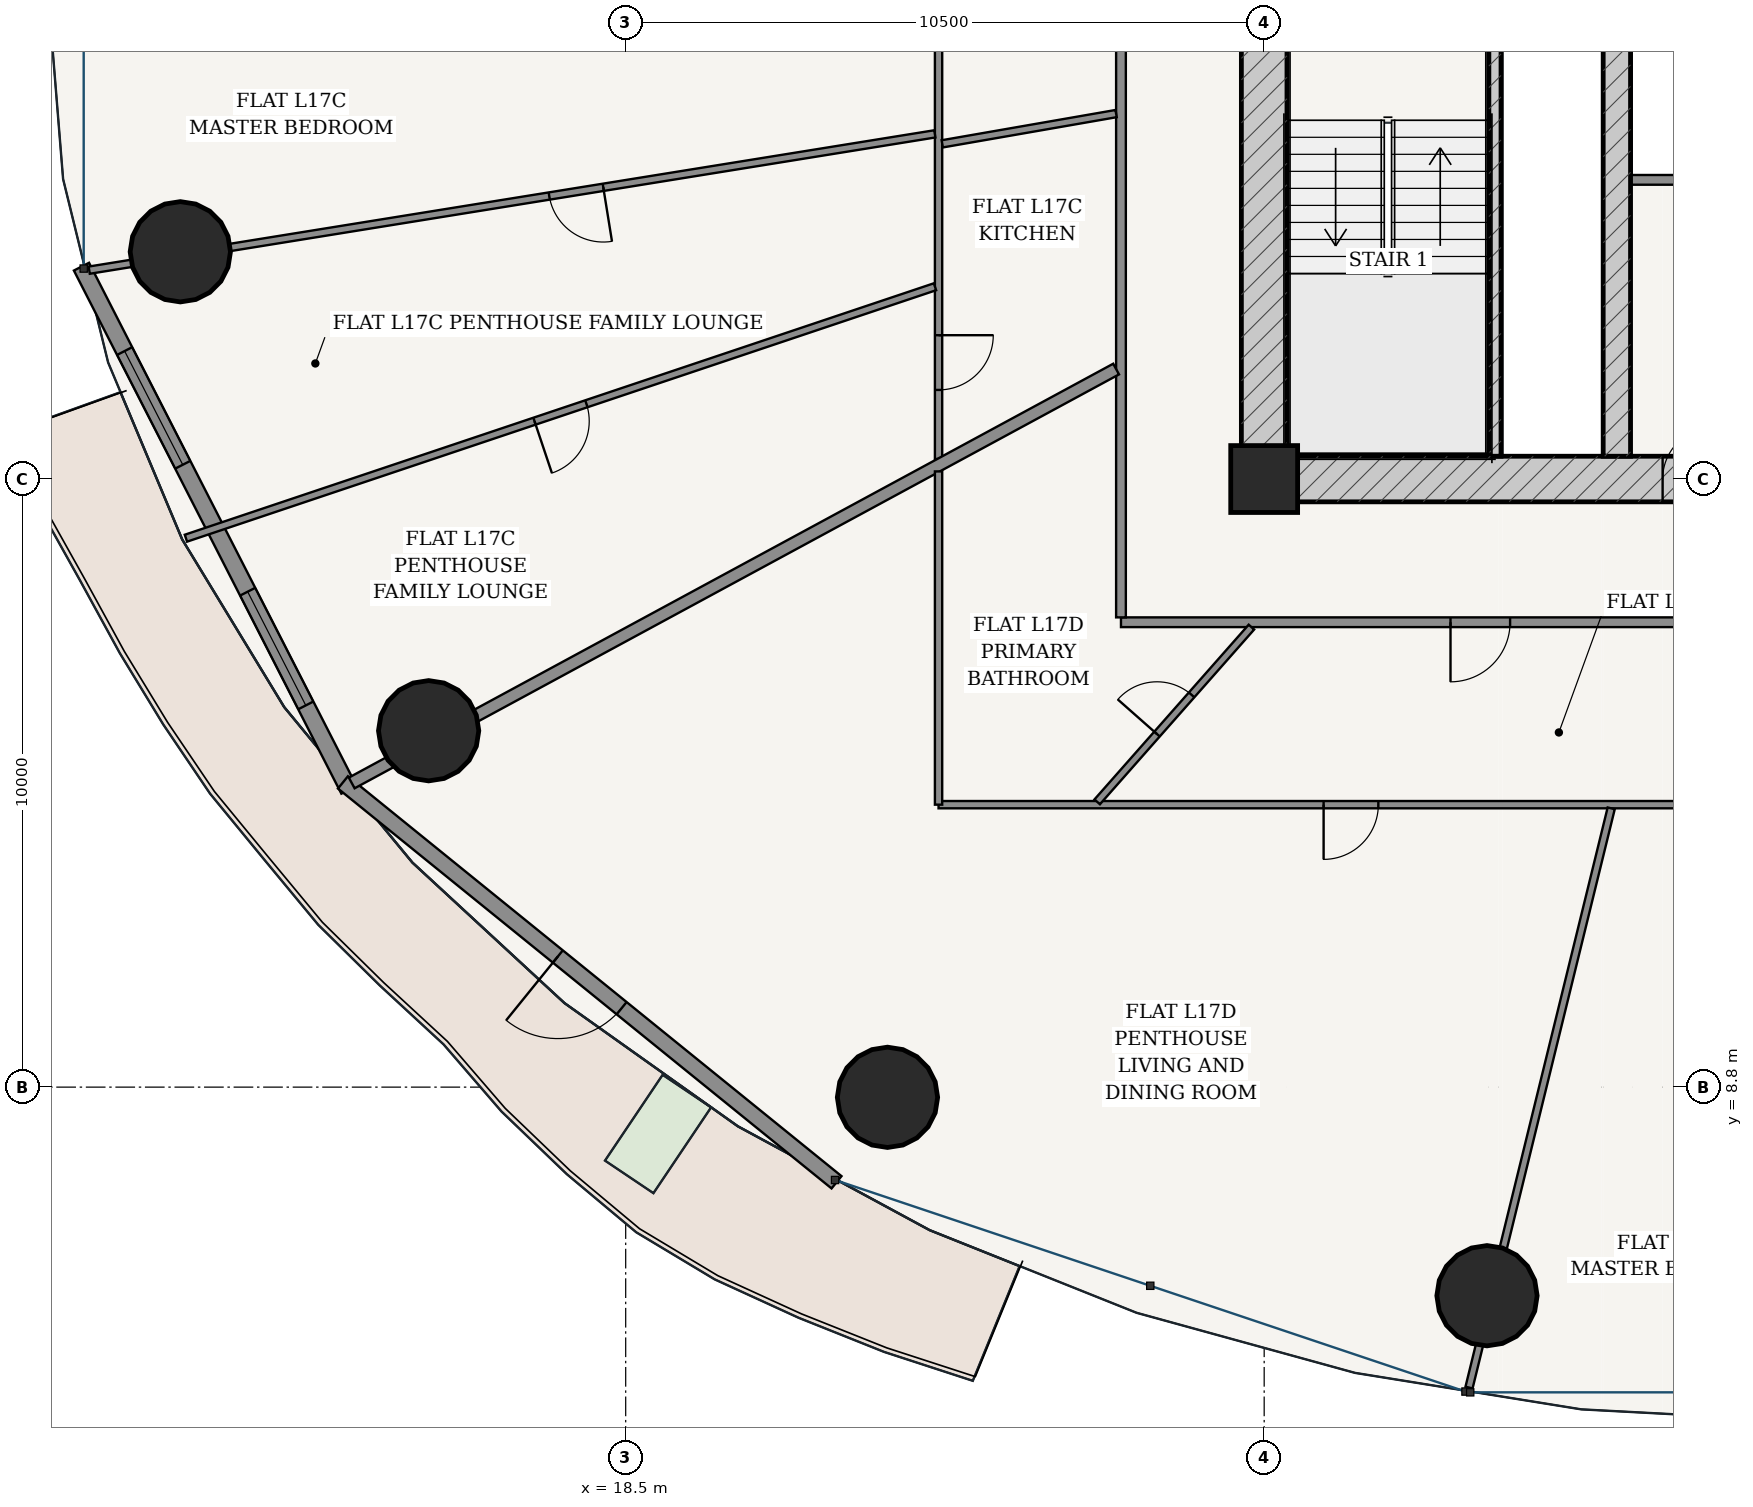
"""IFC4 building model, lengths in metres.
Left out: names, types, materials, properties, quantities, classifications, styles, units other than length and angle.
Written with IfcOpenShell. Run it as: python <this file> out.ifc"""

import sys

from ifc_helpers import new_model, si_unit, direction, frame, frame_2d, origin, origin_2d, place, context, subcontext, project, spatial, rectangle, hollow_circle, extrude, source, transform, mapped, element, fill, save


model = new_model("IFC4")
c1 = context("Model", 3, precision=1e-05, world=origin(), true_north=direction((-0.2419218956, 0.970295726276)))
c2 = subcontext(c1, "Body", "Model", "MODEL_VIEW")
j1 = project(units=[si_unit("LENGTHUNIT", "METRE"), si_unit("PLANEANGLEUNIT", "RADIAN")], contexts=[c1])
p1 = place(None, origin())
s1 = spatial("IfcSite", under=j1, at=p1, CompositionType="ELEMENT")
p2 = place(p1, origin())
s2 = spatial("IfcBuilding", under=s1, at=p2, CompositionType="ELEMENT")
p3 = place(p2, frame((0.0, 0.0, 67.2)))
s3 = spatial("IfcBuildingStorey", under=s2, at=p3, CompositionType="ELEMENT", Elevation=67.2)
p4 = place(p3, frame((29.0, 18.8, 0.0), z_axis=(0.0, 0.0, 1.0), x_axis=(1.0, 0.0, 0.0)))
e1 = element("IfcColumn", 1, at=p4, inside=s3, PredefinedType="COLUMN", context=c2, shape_type="SweptSolid", body=[
    extrude(rectangle(XDim=1.1, YDim=1.1, at=origin_2d()), origin(), (0.0, 0.0, 1.0), 3.6),
])
p5 = place(p3, frame((28.625, 18.8, 0.0), z_axis=(0.0, 0.0, 1.0), x_axis=(1.0, 0.0, 0.0)))
e2 = element("IfcWall", 2, at=p5, inside=s3, PredefinedType="SHEAR", context=c2, shape_type="SweptSolid", body=[
    extrude(rectangle(XDim=18.75, YDim=0.75, at=frame_2d((9.375, 0.0))), origin(), (0.0, 0.0, 1.0), 3.32),
])
p6 = place(p5, frame((6.927, 0.0, 0.0)))
e3 = element("IfcOpeningElement", 3, at=p6, cuts=e2, PredefinedType="OPENING", context=c2, shape_type="SweptSolid", body=[
    extrude(rectangle(XDim=0.85, YDim=2.1, at=frame_2d((0.425, 1.05))), frame((0.0, 0.385, 0.0), z_axis=(0.0, -1.0, 0.0), x_axis=(1.0, 0.0, 0.0)), (0.0, 0.0, 1.0), 0.77),
])
p7 = place(p5, frame((8.95, 0.0, 0.0)))
e4 = element("IfcOpeningElement", 4, at=p7, cuts=e2, PredefinedType="OPENING", context=c2, shape_type="SweptSolid", body=[
    extrude(rectangle(XDim=0.85, YDim=2.1, at=frame_2d((0.425, 1.05))), frame((0.0, 0.385, 0.0), z_axis=(0.0, -1.0, 0.0), x_axis=(1.0, 0.0, 0.0)), (0.0, 0.0, 1.0), 0.77),
])
p8 = place(p5, frame((10.972, 0.0, 0.0)))
e5 = element("IfcOpeningElement", 5, at=p8, cuts=e2, PredefinedType="OPENING", context=c2, shape_type="SweptSolid", body=[
    extrude(rectangle(XDim=0.85, YDim=2.1, at=frame_2d((0.425, 1.05))), frame((0.0, 0.385, 0.0), z_axis=(0.0, -1.0, 0.0), x_axis=(1.0, 0.0, 0.0)), (0.0, 0.0, 1.0), 0.77),
])
p9 = place(p3, frame((29.0, 19.175, 0.0), z_axis=(0.0, 0.0, 1.0), x_axis=(0.0, 1.0, 0.0)))
e6 = element("IfcWall", 6, at=p9, inside=s3, PredefinedType="SHEAR", context=c2, shape_type="SweptSolid", body=[
    extrude(rectangle(XDim=15.25, YDim=0.75, at=frame_2d((7.625, 0.0))), origin(), (0.0, 0.0, 1.0), 3.32),
])
p10 = place(p9, frame((9.875, 0.0, 0.0)))
e7 = element("IfcOpeningElement", 7, at=p10, cuts=e6, PredefinedType="OPENING", context=c2, shape_type="SweptSolid", body=[
    extrude(rectangle(XDim=1.5, YDim=2.2, at=frame_2d((0.75, 1.1))), frame((0.0, 0.385, 0.0), z_axis=(0.0, -1.0, 0.0), x_axis=(1.0, 0.0, 0.0)), (0.0, 0.0, 1.0), 0.77),
])
p11 = place(p3, frame((32.795, 19.175, 0.0), z_axis=(0.0, 0.0, 1.0), x_axis=(0.0, 1.0, 0.0)))
e8 = element("IfcWall", 8, at=p11, inside=s3, PredefinedType="SOLIDWALL", context=c2, shape_type="SweptSolid", body=[
    extrude(rectangle(XDim=7.375, YDim=0.2, at=frame_2d((3.688, 0.0))), origin(), (0.0, 0.0, 1.0), 3.32),
])
p12 = place(p3, frame((34.8, 19.175, 0.0), z_axis=(0.0, 0.0, 1.0), x_axis=(0.0, 1.0, 0.0)))
e9 = element("IfcWall", 9, at=p12, inside=s3, PredefinedType="SHEAR", context=c2, shape_type="SweptSolid", body=[
    extrude(rectangle(XDim=15.25, YDim=0.45, at=frame_2d((7.625, 0.0))), origin(), (0.0, 0.0, 1.0), 3.32),
])
p13 = place(p12, frame((7.8, 0.0, 0.0)))
e10 = element("IfcOpeningElement", 10, at=p13, cuts=e9, PredefinedType="OPENING", context=c2, shape_type="SweptSolid", body=[
    extrude(rectangle(XDim=1.05, YDim=2.15, at=frame_2d((0.525, 1.075))), frame((0.0, 0.235, 0.0), z_axis=(0.0, -1.0, 0.0), x_axis=(1.0, 0.0, 0.0)), (0.0, 0.0, 1.0), 0.47),
])
for number, where, z_axis, x_axis in (
    (11, (11.176, 22.537, 0.0), (0.0, 0.0, 1.0), (1.0, 0.0, 0.0)),
    (12, (15.259, 14.661, 0.0), (0.0, 0.0, 1.0), (1.0, 0.0, 0.0)),
    (13, (22.805, 8.632, 0.0), (0.0, 0.0, 1.0), (1.0, 0.0, 0.0)),
    (14, (32.664, 5.37, 0.0), (0.0, 0.0, 1.0), (1.0, 0.0, 0.0)),
):
    element("IfcColumn", number, at=place(p3, frame(where, z_axis=z_axis, x_axis=x_axis)), inside=s3, PredefinedType="COLUMN", context=c2, shape_type="SweptSolid", body=[
        extrude(hollow_circle(Radius=0.825, WallThickness=0.05, at=origin_2d()), origin(), (0.0, 0.0, 1.0), 3.6),
    ])
p14 = place(p3, frame((9.55, 22.292, 0.0), z_axis=(0.0, 0.0, 1.0), x_axis=(0.455220575541, -0.890378698984, 0.0)))
e15 = element("IfcWall", 15, at=p14, inside=s3, PredefinedType="SOLIDWALL", context=c2, shape_type="SweptSolid", body=[
    extrude(rectangle(XDim=9.662, YDim=0.28, at=frame_2d((4.831, 0.0))), origin(), (0.0, 0.0, 1.0), 3.32),
])
p15 = place(p14, frame((1.559, 0.0, 0.85)))
e16 = element("IfcOpeningElement", 16, at=p15, cuts=e15, PredefinedType="OPENING", context=c2, shape_type="SweptSolid", body=[
    extrude(rectangle(XDim=2.1, YDim=1.95, at=frame_2d((1.05, 0.975))), frame((0.0, 0.15, 0.0), z_axis=(0.0, -1.0, 0.0), x_axis=(1.0, 0.0, 0.0)), (0.0, 0.0, 1.0), 0.3),
])
p16 = place(p14, frame((6.003, 0.0, 0.85)))
e17 = element("IfcOpeningElement", 17, at=p16, cuts=e15, PredefinedType="OPENING", context=c2, shape_type="SweptSolid", body=[
    extrude(rectangle(XDim=2.1, YDim=1.95, at=frame_2d((1.05, 0.975))), frame((0.0, 0.15, 0.0), z_axis=(0.0, -1.0, 0.0), x_axis=(1.0, 0.0, 0.0)), (0.0, 0.0, 1.0), 0.3),
])
p17 = place(p3, frame((13.85, 13.811, 0.0), z_axis=(0.0, 0.0, 1.0), x_axis=(0.777016782851, -0.629479879875, 0.0)))
e18 = element("IfcWall", 18, at=p17, inside=s3, PredefinedType="SOLIDWALL", context=c2, shape_type="SweptSolid", body=[
    extrude(rectangle(XDim=10.447, YDim=0.26, at=frame_2d((5.223, 0.0))), origin(), (0.0, 0.0, 1.0), 3.32),
])
p18 = place(p17, frame((4.548, 0.0, 0.0)))
e19 = element("IfcOpeningElement", 19, at=p18, cuts=e18, PredefinedType="OPENING", context=c2, shape_type="SweptSolid", body=[
    extrude(rectangle(XDim=1.35, YDim=2.2, at=frame_2d((0.675, 1.1))), frame((0.0, 0.14, 0.0), z_axis=(0.0, -1.0, 0.0), x_axis=(1.0, 0.0, 0.0)), (0.0, 0.0, 1.0), 0.28),
])
p19 = place(p3, frame((35.025, 23.72, 0.0), z_axis=(0.0, 0.0, 1.0), x_axis=(1.0, 0.0, 0.0)))
e20 = element("IfcWall", 20, at=p19, inside=s3, PredefinedType="PARTITIONING", context=c2, shape_type="SweptSolid", body=[
    extrude(rectangle(XDim=5.95, YDim=0.16, at=frame_2d((2.975, 0.0))), origin(), (0.0, 0.0, 1.0), 3.32),
])
p20 = place(p3, frame((26.645, 16.445, 0.0), z_axis=(0.0, 0.0, 1.0), x_axis=(1.0, 0.0, 0.0)))
e21 = element("IfcWall", 21, at=p20, inside=s3, PredefinedType="PARTITIONING", context=c2, shape_type="SweptSolid", body=[
    extrude(rectangle(XDim=22.71, YDim=0.16, at=frame_2d((11.355, 0.0))), origin(), (0.0, 0.0, 1.0), 2.688),
])
p21 = place(p20, frame((5.419, 0.0, 0.0)))
e22 = element("IfcOpeningElement", 22, at=p21, cuts=e21, PredefinedType="OPENING", context=c2, shape_type="SweptSolid", body=[
    extrude(rectangle(XDim=0.98, YDim=2.2, at=frame_2d((0.49, 1.1))), frame((0.0, 0.09, 0.0), z_axis=(0.0, -1.0, 0.0), x_axis=(1.0, 0.0, 0.0)), (0.0, 0.0, 1.0), 0.18),
])
p22 = place(p3, frame((26.645, 16.525, 0.0), z_axis=(0.0, 0.0, 1.0), x_axis=(0.0, 1.0, 0.0)))
e23 = element("IfcWall", 23, at=p22, inside=s3, PredefinedType="PARTITIONING", context=c2, shape_type="SweptSolid", body=[
    extrude(rectangle(XDim=20.55, YDim=0.16, at=frame_2d((10.275, 0.0))), origin(), (0.0, 0.0, 1.0), 2.688),
])
p23 = place(p22, frame((16.199, 0.0, 0.0)))
e24 = element("IfcOpeningElement", 24, at=p23, cuts=e23, PredefinedType="OPENING", context=c2, shape_type="SweptSolid", body=[
    extrude(rectangle(XDim=0.98, YDim=2.2, at=frame_2d((0.49, 1.1))), frame((0.0, 0.09, 0.0), z_axis=(0.0, -1.0, 0.0), x_axis=(1.0, 0.0, 0.0)), (0.0, 0.0, 1.0), 0.18),
])
p24 = place(p3, frame((23.645, 19.129, 0.0), z_axis=(0.0, 0.0, 1.0), x_axis=(0.0, 1.0, 0.0)))
e25 = element("IfcWall", 25, at=p24, inside=s3, PredefinedType="PARTITIONING", context=c2, shape_type="SweptSolid", body=[
    extrude(rectangle(XDim=19.201, YDim=0.12, at=frame_2d((9.601, 0.0))), origin(), (0.0, 0.0, 1.0), 2.688),
])
p25 = place(p24, frame((15.038, 0.0, 0.0)))
e26 = element("IfcOpeningElement", 26, at=p25, cuts=e25, PredefinedType="OPENING", context=c2, shape_type="SweptSolid", body=[
    extrude(rectangle(XDim=0.9, YDim=2.15, at=frame_2d((0.45, 1.075))), frame((0.0, 0.07, 0.0), z_axis=(0.0, -1.0, 0.0), x_axis=(1.0, 0.0, 0.0)), (0.0, 0.0, 1.0), 0.14),
])
p26 = place(p24, frame((1.136, 0.0, 0.0)))
e27 = element("IfcOpeningElement", 27, at=p26, cuts=e25, PredefinedType="OPENING", context=c2, shape_type="SweptSolid", body=[
    extrude(rectangle(XDim=0.9, YDim=2.15, at=frame_2d((0.45, 1.075))), frame((0.0, 0.07, 0.0), z_axis=(0.0, -1.0, 0.0), x_axis=(1.0, 0.0, 0.0)), (0.0, 0.0, 1.0), 0.14),
])
p27 = place(p3, frame((23.584, 24.476, 0.0), z_axis=(0.0, 0.0, 1.0), x_axis=(-0.987257727093, -0.159129445092, 0.0)))
e28 = element("IfcWall", 28, at=p27, inside=s3, PredefinedType="PARTITIONING", context=c2, shape_type="SweptSolid", body=[
    extrude(rectangle(XDim=14.086, YDim=0.12, at=frame_2d((7.043, 0.0))), origin(), (0.0, 0.0, 1.0), 2.688),
])
p28 = place(p27, frame((5.523, 0.0, 0.0)))
e29 = element("IfcOpeningElement", 29, at=p28, cuts=e28, PredefinedType="OPENING", context=c2, shape_type="SweptSolid", body=[
    extrude(rectangle(XDim=0.9, YDim=2.15, at=frame_2d((0.45, 1.075))), frame((0.0, 0.07, 0.0), z_axis=(0.0, -1.0, 0.0), x_axis=(1.0, 0.0, 0.0)), (0.0, 0.0, 1.0), 0.14),
])
p29 = place(p3, frame((23.586, 21.962, 0.0), z_axis=(0.0, 0.0, 1.0), x_axis=(-0.948021751459, -0.318205529118, 0.0)))
e30 = element("IfcWall", 30, at=p29, inside=s3, PredefinedType="PARTITIONING", context=c2, shape_type="SweptSolid", body=[
    extrude(rectangle(XDim=12.994, YDim=0.12, at=frame_2d((6.497, 0.0))), origin(), (0.0, 0.0, 1.0), 2.762),
])
p30 = place(p29, frame((6.047, 0.0, 0.0)))
e31 = element("IfcOpeningElement", 31, at=p30, cuts=e30, PredefinedType="OPENING", context=c2, shape_type="SweptSolid", body=[
    extrude(rectangle(XDim=0.9, YDim=2.15, at=frame_2d((0.45, 1.075))), frame((0.0, 0.07, 0.0), z_axis=(0.0, -1.0, 0.0), x_axis=(1.0, 0.0, 0.0)), (0.0, 0.0, 1.0), 0.14),
])
p31 = place(p3, frame((26.565, 24.81, 0.0), z_axis=(0.0, 0.0, 1.0), x_axis=(-0.985190752909, -0.171461891924, 0.0)))
e32 = element("IfcWall", 32, at=p31, inside=s3, PredefinedType="PARTITIONING", context=c2, shape_type="SweptSolid", body=[
    extrude(rectangle(XDim=2.902, YDim=0.12, at=frame_2d((1.451, 0.0))), origin(), (0.0, 0.0, 1.0), 2.688),
])
p32 = place(p3, frame((26.565, 20.608, 0.0), z_axis=(0.0, 0.0, 1.0), x_axis=(-0.879369737803, -0.476139542819, 0.0)))
e33 = element("IfcWall", 33, at=p32, inside=s3, PredefinedType="PARTITIONING", context=c2, shape_type="SweptSolid", body=[
    extrude(rectangle(XDim=14.295, YDim=0.2, at=frame_2d((7.147, 0.0))), origin(), (0.0, 0.0, 1.0), 2.688),
])
p33 = place(p3, frame((41.176, 13.445, 0.0), z_axis=(0.0, 0.0, 1.0), x_axis=(-1.0, 0.0, 0.0)))
e34 = element("IfcWall", 34, at=p33, inside=s3, PredefinedType="PARTITIONING", context=c2, shape_type="SweptSolid", body=[
    extrude(rectangle(XDim=17.531, YDim=0.12, at=frame_2d((8.766, 0.0))), origin(), (0.0, 0.0, 1.0), 2.688),
])
p34 = place(p33, frame((10.299, 0.0, 0.0)))
e35 = element("IfcOpeningElement", 35, at=p34, cuts=e34, PredefinedType="OPENING", context=c2, shape_type="SweptSolid", body=[
    extrude(rectangle(XDim=0.9, YDim=2.15, at=frame_2d((0.45, 1.075))), frame((0.0, 0.07, 0.0), z_axis=(0.0, -1.0, 0.0), x_axis=(1.0, 0.0, 0.0)), (0.0, 0.0, 1.0), 0.14),
])
p35 = place(p33, frame((1.258, 0.0, 0.0)))
e36 = element("IfcOpeningElement", 36, at=p35, cuts=e34, PredefinedType="OPENING", context=c2, shape_type="SweptSolid", body=[
    extrude(rectangle(XDim=0.9, YDim=2.15, at=frame_2d((0.45, 1.075))), frame((0.0, 0.07, 0.0), z_axis=(0.0, -1.0, 0.0), x_axis=(1.0, 0.0, 0.0)), (0.0, 0.0, 1.0), 0.14),
])
p36 = place(p3, frame((23.645, 13.445, 0.0), z_axis=(0.0, 0.0, 1.0), x_axis=(0.0, 1.0, 0.0)))
e37 = element("IfcWall", 37, at=p36, inside=s3, PredefinedType="PARTITIONING", context=c2, shape_type="SweptSolid", body=[
    extrude(rectangle(XDim=5.48, YDim=0.12, at=frame_2d((2.74, 0.0))), origin(), (0.0, 0.0, 1.0), 2.999),
])
p37 = place(p3, frame((34.707, 13.385, 0.0), z_axis=(0.0, 0.0, 1.0), x_axis=(-0.238386763388, -0.971170299711, 0.0)))
e38 = element("IfcWall", 38, at=p37, inside=s3, PredefinedType="PARTITIONING", context=c2, shape_type="SweptSolid", body=[
    extrude(rectangle(XDim=9.808, YDim=0.12, at=frame_2d((4.904, 0.0))), origin(), (0.0, 0.0, 1.0), 2.688),
])
p38 = place(p3, frame((28.79, 16.365, 0.0), z_axis=(0.0, 0.0, 1.0), x_axis=(-0.661718545222, -0.749752337048, 0.0)))
e39 = element("IfcWall", 39, at=p38, inside=s3, PredefinedType="PARTITIONING", context=c2, shape_type="SweptSolid", body=[
    extrude(rectangle(XDim=3.833, YDim=0.12, at=frame_2d((1.917, 0.0))), origin(), (0.0, 0.0, 1.0), 2.999),
])
p39 = place(p38, frame((1.486, 0.0, 0.0)))
e40 = element("IfcOpeningElement", 40, at=p39, cuts=e39, PredefinedType="OPENING", context=c2, shape_type="SweptSolid", body=[
    extrude(rectangle(XDim=0.86, YDim=2.15, at=frame_2d((0.43, 1.075))), frame((0.0, 0.07, 0.0), z_axis=(0.0, -1.0, 0.0), x_axis=(1.0, 0.0, 0.0)), (0.0, 0.0, 1.0), 0.14),
])
m1 = source(origin(), c2, "Body", "SweptSolid", [
    extrude(rectangle(XDim=2.1, YDim=1.95, at=frame_2d((1.05, 0.975))), frame((0.0, 0.03, 0.0), z_axis=(0.0, -1.0, 0.0), x_axis=(1.0, 0.0, 0.0)), (0.0, 0.0, 1.0), 0.06),
])
p40 = place(p15, origin())
e41 = element("IfcWindow", 41, at=p40, inside=s3, PartitioningType="SINGLE_PANEL", PredefinedType="WINDOW", context=c2, shape_type="MappedRepresentation", body=[
    mapped(m1, transform((0.0, 0.0, 0.0), scale=1.0)),
])
fill(e16, e41)
p41 = place(p16, origin())
e42 = element("IfcWindow", 42, at=p41, inside=s3, PartitioningType="SINGLE_PANEL", PredefinedType="WINDOW", context=c2, shape_type="MappedRepresentation", body=[
    mapped(m1, transform((0.0, 0.0, 0.0), scale=1.0)),
])
fill(e17, e42)
m2 = source(origin(), c2, "Body", "SweptSolid", [
    extrude(rectangle(XDim=1.35, YDim=2.2, at=frame_2d((0.675, 1.1))), frame((0.0, 0.025, 0.0), z_axis=(0.0, -1.0, 0.0), x_axis=(1.0, 0.0, 0.0)), (0.0, 0.0, 1.0), 0.05),
])
p42 = place(p18, frame((1.35, 0.0, 0.0), z_axis=(0.0, 0.0, 1.0), x_axis=(-1.0, 0.0, 0.0)))
e43 = element("IfcDoor", 43, at=p42, inside=s3, OperationType="SINGLE_SWING_RIGHT", PredefinedType="DOOR", context=c2, shape_type="MappedRepresentation", body=[
    mapped(m2, transform((0.0, 0.0, 0.0), scale=1.0)),
])
fill(e19, e43)
m3 = source(origin(), c2, "Body", "SweptSolid", [
    extrude(rectangle(XDim=0.85, YDim=2.1, at=frame_2d((0.425, 1.05))), frame((0.0, 0.025, 0.0), z_axis=(0.0, -1.0, 0.0), x_axis=(1.0, 0.0, 0.0)), (0.0, 0.0, 1.0), 0.05),
])
p43 = place(p6, origin())
e44 = element("IfcDoor", 44, at=p43, inside=s3, OperationType="SINGLE_SWING_RIGHT", PredefinedType="DOOR", context=c2, shape_type="MappedRepresentation", body=[
    mapped(m3, transform((0.0, 0.0, 0.0), scale=1.0)),
])
fill(e3, e44)
m4 = source(origin(), c2, "Body", "SweptSolid", [
    extrude(rectangle(XDim=0.9, YDim=2.15, at=frame_2d((0.45, 1.075))), frame((0.0, 0.025, 0.0), z_axis=(0.0, -1.0, 0.0), x_axis=(1.0, 0.0, 0.0)), (0.0, 0.0, 1.0), 0.05),
])
p44 = place(p28, origin())
e45 = element("IfcDoor", 45, at=p44, inside=s3, OperationType="SINGLE_SWING_LEFT", PredefinedType="DOOR", context=c2, shape_type="MappedRepresentation", body=[
    mapped(m4, transform((0.0, 0.0, 0.0), scale=1.0)),
])
fill(e29, e45)
p45 = place(p30, origin())
e46 = element("IfcDoor", 46, at=p45, inside=s3, OperationType="SINGLE_SWING_RIGHT", PredefinedType="DOOR", context=c2, shape_type="MappedRepresentation", body=[
    mapped(m4, transform((0.0, 0.0, 0.0), scale=1.0)),
])
fill(e31, e46)
p46 = place(p26, frame((0.9, 0.0, 0.0), z_axis=(0.0, 0.0, 1.0), x_axis=(-1.0, 0.0, 0.0)))
e47 = element("IfcDoor", 47, at=p46, inside=s3, OperationType="SINGLE_SWING_LEFT", PredefinedType="DOOR", context=c2, shape_type="MappedRepresentation", body=[
    mapped(m4, transform((0.0, 0.0, 0.0), scale=1.0)),
])
fill(e27, e47)
m5 = source(origin(), c2, "Body", "SweptSolid", [
    extrude(rectangle(XDim=0.98, YDim=2.2, at=frame_2d((0.49, 1.1))), frame((0.0, 0.025, 0.0), z_axis=(0.0, -1.0, 0.0), x_axis=(1.0, 0.0, 0.0)), (0.0, 0.0, 1.0), 0.05),
])
p47 = place(p21, frame((0.98, 0.0, 0.0), z_axis=(0.0, 0.0, 1.0), x_axis=(-1.0, 0.0, 0.0)))
e48 = element("IfcDoor", 48, at=p47, inside=s3, OperationType="SINGLE_SWING_RIGHT", PredefinedType="DOOR", context=c2, shape_type="MappedRepresentation", body=[
    mapped(m5, transform((0.0, 0.0, 0.0), scale=1.0)),
])
fill(e22, e48)
m6 = source(origin(), c2, "Body", "SweptSolid", [
    extrude(rectangle(XDim=0.86, YDim=2.15, at=frame_2d((0.43, 1.075))), frame((0.0, 0.025, 0.0), z_axis=(0.0, -1.0, 0.0), x_axis=(1.0, 0.0, 0.0)), (0.0, 0.0, 1.0), 0.05),
])
p48 = place(p39, frame((0.86, 0.0, 0.0), z_axis=(0.0, 0.0, 1.0), x_axis=(-1.0, 0.0, 0.0)))
e49 = element("IfcDoor", 49, at=p48, inside=s3, OperationType="SINGLE_SWING_LEFT", PredefinedType="DOOR", context=c2, shape_type="MappedRepresentation", body=[
    mapped(m6, transform((0.0, 0.0, 0.0), scale=1.0)),
])
fill(e40, e49)
p49 = place(p34, origin())
e50 = element("IfcDoor", 50, at=p49, inside=s3, OperationType="SINGLE_SWING_RIGHT", PredefinedType="DOOR", context=c2, shape_type="MappedRepresentation", body=[
    mapped(m4, transform((0.0, 0.0, 0.0), scale=1.0)),
])
fill(e35, e50)
save(model, sys.argv[1])
